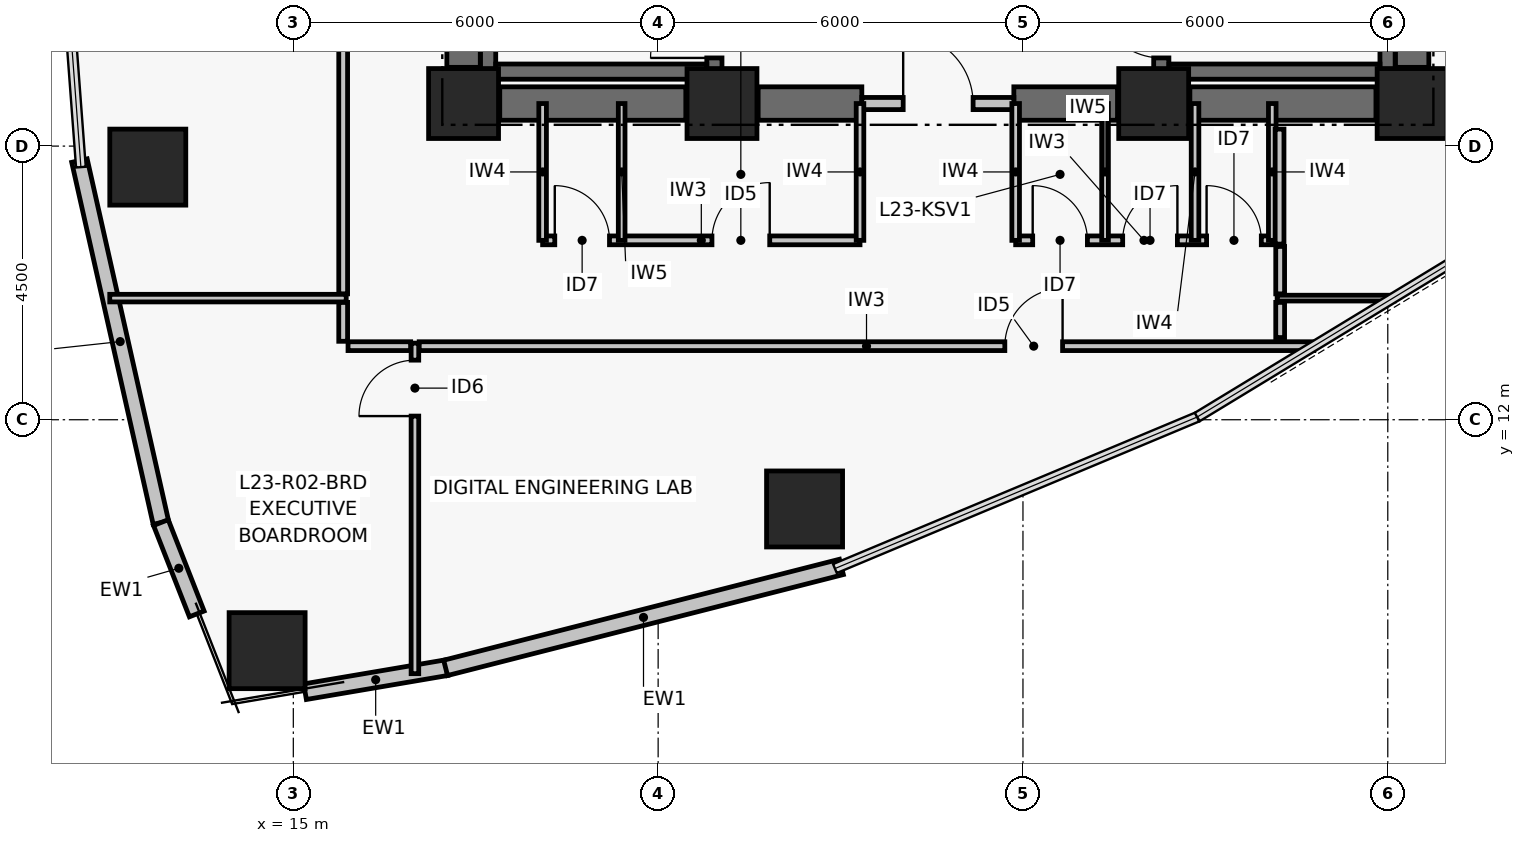
"""IFC4 building model, lengths in metres.
Left out: names, types, materials, properties, quantities, classifications, styles, units other than length and angle.
Written with IfcOpenShell. Run it as: python <this file> out.ifc"""

import sys

from ifc_helpers import new_model, si_unit, direction, frame, frame_2d, origin, origin_2d, place, context, subcontext, project, spatial, rectangle, hollow_rectangle, extrude, element, fill, save


model = new_model("IFC4")
c1 = context("Model", 3, precision=1e-05, world=origin(), true_north=direction((0.0, 1.0)))
c2 = subcontext(c1, "Body", "Model", "MODEL_VIEW")
j1 = project(units=[si_unit("LENGTHUNIT", "METRE"), si_unit("PLANEANGLEUNIT", "RADIAN")], contexts=[c1])
p1 = place(None, origin())
s1 = spatial("IfcSite", under=j1, at=p1, CompositionType="ELEMENT")
p2 = place(p1, origin())
s2 = spatial("IfcBuilding", under=s1, at=p2, CompositionType="ELEMENT")
p3 = place(p2, frame((0.0, 0.0, 96.54)))
s3 = spatial("IfcBuildingStorey", under=s2, at=p3, CompositionType="ELEMENT", Elevation=96.54)
for number, where, z_axis, x_axis in (
    (1, (17.8, 17.2, 0.0), (0.0, 0.0, 1.0), (1.0, 0.0, 0.0)),
    (2, (22.05, 17.2, 0.0), (0.0, 0.0, 1.0), (1.0, 0.0, 0.0)),
    (3, (29.15, 17.2, 0.0), (0.0, 0.0, 1.0), (1.0, 0.0, 0.0)),
    (4, (33.4, 17.2, 0.0), (0.0, 0.0, 1.0), (1.0, 0.0, 0.0)),
):
    element("IfcColumn", number, at=place(p3, frame(where, z_axis=z_axis, x_axis=x_axis)), inside=s3, PredefinedType="COLUMN", context=c2, shape_type="SweptSolid", body=[
        extrude(rectangle(XDim=1.15, YDim=1.15, at=origin_2d()), origin(), (0.0, 0.0, 1.0), 3.72),
    ])
p4 = place(p3, frame((18.395, 17.2, 0.0), z_axis=(0.0, 0.0, 1.0), x_axis=(1.0, 0.0, 0.0)))
e5 = element("IfcWall", 5, at=p4, inside=s3, PredefinedType="SHEAR", context=c2, shape_type="SweptSolid", body=[
    extrude(rectangle(XDim=3.06, YDim=0.55, at=frame_2d((1.53, 0.0))), origin(), (0.0, 0.0, 1.0), 3.47),
])
p5 = place(p3, frame((22.645, 17.2, 0.0), z_axis=(0.0, 0.0, 1.0), x_axis=(1.0, 0.0, 0.0)))
e6 = element("IfcWall", 6, at=p5, inside=s3, PredefinedType="SHEAR", context=c2, shape_type="SweptSolid", body=[
    extrude(rectangle(XDim=1.705, YDim=0.55, at=frame_2d((0.853, 0.0))), origin(), (0.0, 0.0, 1.0), 3.47),
])
p6 = place(p3, frame((26.85, 17.2, 0.0), z_axis=(0.0, 0.0, 1.0), x_axis=(1.0, 0.0, 0.0)))
e7 = element("IfcWall", 7, at=p6, inside=s3, PredefinedType="SHEAR", context=c2, shape_type="SweptSolid", body=[
    extrude(rectangle(XDim=1.705, YDim=0.55, at=frame_2d((0.853, 0.0))), origin(), (0.0, 0.0, 1.0), 3.47),
])
p7 = place(p3, frame((29.745, 17.2, 0.0), z_axis=(0.0, 0.0, 1.0), x_axis=(1.0, 0.0, 0.0)))
e8 = element("IfcWall", 8, at=p7, inside=s3, PredefinedType="SHEAR", context=c2, shape_type="SweptSolid", body=[
    extrude(rectangle(XDim=3.06, YDim=0.55, at=frame_2d((1.53, 0.0))), origin(), (0.0, 0.0, 1.0), 3.47),
])
for number, where, z_axis, x_axis in (
    (9, (17.8, 17.795, 0.0), (0.0, 0.0, 1.0), (0.0, 1.0, 0.0)),
    (10, (33.4, 17.795, 0.0), (0.0, 0.0, 1.0), (0.0, 1.0, 0.0)),
):
    element("IfcWall", number, at=place(p3, frame(where, z_axis=z_axis, x_axis=x_axis)), inside=s3, PredefinedType="SHEAR", context=c2, shape_type="SweptSolid", body=[
        extrude(rectangle(XDim=8.41, YDim=0.55, at=frame_2d((4.205, 0.0))), origin(), (0.0, 0.0, 1.0), 3.47),
    ])
p8 = place(p3, frame((18.204, 17.6, 0.0), z_axis=(0.0, 0.0, 1.0), x_axis=(0.0, 1.0, 0.0)))
e11 = element("IfcWall", 11, at=p8, inside=s3, PredefinedType="SHEAR", context=c2, shape_type="SweptSolid", body=[
    extrude(rectangle(XDim=8.8, YDim=0.25, at=frame_2d((4.4, 0.0))), origin(), (0.0, 0.0, 1.0), 3.47),
])
p9 = place(p3, frame((21.925, 17.6, 0.0), z_axis=(0.0, 0.0, 1.0), x_axis=(0.0, 1.0, 0.0)))
e12 = element("IfcWall", 12, at=p9, inside=s3, PredefinedType="SHEAR", context=c2, shape_type="SweptSolid", body=[
    extrude(rectangle(XDim=8.8, YDim=0.25, at=frame_2d((4.4, 0.0))), origin(), (0.0, 0.0, 1.0), 3.47),
])
p10 = place(p9, frame((0.35, 0.0, 0.0)))
e13 = element("IfcOpeningElement", 13, at=p10, cuts=e12, PredefinedType="OPENING", context=c2, shape_type="SweptSolid", body=[
    extrude(rectangle(XDim=1.05, YDim=2.08, at=frame_2d((0.525, 1.04))), frame((0.0, 0.135, 0.0), z_axis=(0.0, -1.0, 0.0), x_axis=(1.0, 0.0, 0.0)), (0.0, 0.0, 1.0), 0.27),
])
p11 = place(p3, frame((18.329, 17.725, 0.0), z_axis=(0.0, 0.0, 1.0), x_axis=(1.0, 0.0, 0.0)))
e14 = element("IfcWall", 14, at=p11, inside=s3, PredefinedType="SHEAR", context=c2, shape_type="SweptSolid", body=[
    extrude(rectangle(XDim=3.471, YDim=0.25, at=frame_2d((1.735, 0.0))), origin(), (0.0, 0.0, 1.0), 3.47),
])
p12 = place(p3, frame((29.275, 17.6, 0.0), z_axis=(0.0, 0.0, 1.0), x_axis=(0.0, 1.0, 0.0)))
e15 = element("IfcWall", 15, at=p12, inside=s3, PredefinedType="SHEAR", context=c2, shape_type="SweptSolid", body=[
    extrude(rectangle(XDim=8.8, YDim=0.25, at=frame_2d((4.4, 0.0))), origin(), (0.0, 0.0, 1.0), 3.47),
])
p13 = place(p12, frame((0.35, 0.0, 0.0)))
e16 = element("IfcOpeningElement", 16, at=p13, cuts=e15, PredefinedType="OPENING", context=c2, shape_type="SweptSolid", body=[
    extrude(rectangle(XDim=1.05, YDim=2.08, at=frame_2d((0.525, 1.04))), frame((0.0, 0.135, 0.0), z_axis=(0.0, -1.0, 0.0), x_axis=(1.0, 0.0, 0.0)), (0.0, 0.0, 1.0), 0.27),
])
p14 = place(p3, frame((32.996, 17.6, 0.0), z_axis=(0.0, 0.0, 1.0), x_axis=(0.0, 1.0, 0.0)))
e17 = element("IfcWall", 17, at=p14, inside=s3, PredefinedType="SHEAR", context=c2, shape_type="SweptSolid", body=[
    extrude(rectangle(XDim=8.8, YDim=0.25, at=frame_2d((4.4, 0.0))), origin(), (0.0, 0.0, 1.0), 3.47),
])
p15 = place(p3, frame((29.4, 17.725, 0.0), z_axis=(0.0, 0.0, 1.0), x_axis=(1.0, 0.0, 0.0)))
e18 = element("IfcWall", 18, at=p15, inside=s3, PredefinedType="SHEAR", context=c2, shape_type="SweptSolid", body=[
    extrude(rectangle(XDim=3.471, YDim=0.25, at=frame_2d((1.736, 0.0))), origin(), (0.0, 0.0, 1.0), 3.47),
])
for number, where, z_axis, x_axis in (
    (19, (12.607, 16.154, 0.0), (0.0, 0.0, 1.0), (1.0, 0.0, 0.0)),
    (20, (14.569, 8.203, 0.0), (0.0, 0.0, 1.0), (1.0, 0.0, 0.0)),
    (21, (23.408, 10.533, 0.0), (0.0, 0.0, 1.0), (1.0, 0.0, 0.0)),
):
    element("IfcColumn", number, at=place(p3, frame(where, z_axis=z_axis, x_axis=x_axis)), inside=s3, PredefinedType="COLUMN", context=c2, shape_type="SweptSolid", body=[
        extrude(hollow_rectangle(XDim=1.25, YDim=1.25, WallThickness=0.05, at=origin_2d()), origin(), (0.0, 0.0, 1.0), 3.72),
    ])
p16 = place(p3, frame((12.822, 10.309, 0.0), z_axis=(0.0, 0.0, 1.0), x_axis=(-0.219535044336, 0.975604614743, 0.0)))
e22 = element("IfcWall", 22, at=p16, inside=s3, PredefinedType="PARTITIONING", context=c2, shape_type="SweptSolid", body=[
    extrude(rectangle(XDim=6.102, YDim=0.26, at=frame_2d((3.051, 0.0))), origin(), (0.0, 0.0, 1.0), 3.47),
])
p17 = place(p3, frame((13.412, 8.806, 0.0), z_axis=(0.0, 0.0, 1.0), x_axis=(-0.365488551504, 0.930815835018, 0.0)))
e23 = element("IfcWall", 23, at=p17, inside=s3, PredefinedType="PARTITIONING", context=c2, shape_type="SweptSolid", body=[
    extrude(rectangle(XDim=1.614, YDim=0.26, at=frame_2d((0.807, 0.0))), origin(), (0.0, 0.0, 1.0), 3.47),
])
p18 = place(p3, frame((17.516, 7.922, 0.0), z_axis=(0.0, 0.0, 1.0), x_axis=(-0.985905269947, -0.167304508875, 0.0)))
e24 = element("IfcWall", 24, at=p18, inside=s3, PredefinedType="PARTITIONING", context=c2, shape_type="SweptSolid", body=[
    extrude(rectangle(XDim=2.357, YDim=0.26, at=frame_2d((1.178, 0.0))), origin(), (0.0, 0.0, 1.0), 3.47),
])
p19 = place(p3, frame((24.014, 9.58, 0.0), z_axis=(0.0, 0.0, 1.0), x_axis=(-0.968981437296, -0.247133514876, 0.0)))
e25 = element("IfcWall", 25, at=p19, inside=s3, PredefinedType="PARTITIONING", context=c2, shape_type="SweptSolid", body=[
    extrude(rectangle(XDim=6.718, YDim=0.26, at=frame_2d((3.359, 0.0))), origin(), (0.0, 0.0, 1.0), 3.47),
])
p20 = place(p3, frame((24.35, 17.2, 0.0), z_axis=(0.0, 0.0, 1.0), x_axis=(1.0, 0.0, 0.0)))
e26 = element("IfcWall", 26, at=p20, inside=s3, PredefinedType="PARTITIONING", context=c2, shape_type="SweptSolid", body=[
    extrude(rectangle(XDim=2.5, YDim=0.2, at=frame_2d((1.25, 0.0))), origin(), (0.0, 0.0, 1.0), 2.6),
])
p21 = place(p20, frame((0.68, 0.0, 0.0)))
e27 = element("IfcOpeningElement", 27, at=p21, cuts=e26, PredefinedType="OPENING", context=c2, shape_type="SweptSolid", body=[
    extrude(rectangle(XDim=1.15, YDim=2.08, at=frame_2d((0.575, 1.04))), frame((0.0, 0.11, 0.0), z_axis=(0.0, -1.0, 0.0), x_axis=(1.0, 0.0, 0.0)), (0.0, 0.0, 1.0), 0.22),
])
p22 = place(p3, frame((19.1, 14.95, 0.0), z_axis=(0.0, 0.0, 1.0), x_axis=(1.0, 0.0, 0.0)))
e28 = element("IfcWall", 28, at=p22, inside=s3, PredefinedType="PARTITIONING", context=c2, shape_type="SweptSolid", body=[
    extrude(rectangle(XDim=5.22, YDim=0.145, at=frame_2d((2.61, 0.0))), origin(), (0.0, 0.0, 1.0), 2.65),
])
p23 = place(p22, frame((0.2, 0.0, 0.0)))
e29 = element("IfcOpeningElement", 29, at=p23, cuts=e28, PredefinedType="OPENING", context=c2, shape_type="SweptSolid", body=[
    extrude(rectangle(XDim=0.9, YDim=2.02, at=frame_2d((0.45, 1.01))), frame((0.0, 0.083, 0.0), z_axis=(0.0, -1.0, 0.0), x_axis=(1.0, 0.0, 0.0)), (0.0, 0.0, 1.0), 0.165),
])
p24 = place(p22, frame((2.785, 0.0, 0.0)))
e30 = element("IfcOpeningElement", 30, at=p24, cuts=e28, PredefinedType="OPENING", context=c2, shape_type="SweptSolid", body=[
    extrude(rectangle(XDim=0.95, YDim=2.06, at=frame_2d((0.475, 1.03))), frame((0.0, 0.083, 0.0), z_axis=(0.0, -1.0, 0.0), x_axis=(1.0, 0.0, 0.0)), (0.0, 0.0, 1.0), 0.165),
])
p25 = place(p3, frame((26.88, 14.95, 0.0), z_axis=(0.0, 0.0, 1.0), x_axis=(1.0, 0.0, 0.0)))
e31 = element("IfcWall", 31, at=p25, inside=s3, PredefinedType="PARTITIONING", context=c2, shape_type="SweptSolid", body=[
    extrude(rectangle(XDim=4.22, YDim=0.145, at=frame_2d((2.11, 0.0))), origin(), (0.0, 0.0, 1.0), 3.05),
])
p26 = place(p25, frame((0.28, 0.0, 0.0)))
e32 = element("IfcOpeningElement", 32, at=p26, cuts=e31, PredefinedType="OPENING", context=c2, shape_type="SweptSolid", body=[
    extrude(rectangle(XDim=0.9, YDim=2.02, at=frame_2d((0.45, 1.01))), frame((0.0, 0.083, 0.0), z_axis=(0.0, -1.0, 0.0), x_axis=(1.0, 0.0, 0.0)), (0.0, 0.0, 1.0), 0.165),
])
p27 = place(p25, frame((1.76, 0.0, 0.0)))
e33 = element("IfcOpeningElement", 33, at=p27, cuts=e31, PredefinedType="OPENING", context=c2, shape_type="SweptSolid", body=[
    extrude(rectangle(XDim=0.9, YDim=2.02, at=frame_2d((0.45, 1.01))), frame((0.0, 0.083, 0.0), z_axis=(0.0, -1.0, 0.0), x_axis=(1.0, 0.0, 0.0)), (0.0, 0.0, 1.0), 0.165),
])
p28 = place(p25, frame((3.14, 0.0, 0.0)))
e34 = element("IfcOpeningElement", 34, at=p28, cuts=e31, PredefinedType="OPENING", context=c2, shape_type="SweptSolid", body=[
    extrude(rectangle(XDim=0.9, YDim=2.02, at=frame_2d((0.45, 1.01))), frame((0.0, 0.083, 0.0), z_axis=(0.0, -1.0, 0.0), x_axis=(1.0, 0.0, 0.0)), (0.0, 0.0, 1.0), 0.165),
])
p29 = place(p3, frame((19.1, 14.95, 0.0), z_axis=(0.0, 0.0, 1.0), x_axis=(0.0, 1.0, 0.0)))
e35 = element("IfcWall", 35, at=p29, inside=s3, PredefinedType="PARTITIONING", context=c2, shape_type="SweptSolid", body=[
    extrude(rectangle(XDim=2.25, YDim=0.125, at=frame_2d((1.125, 0.0))), origin(), (0.0, 0.0, 1.0), 2.6),
])
p30 = place(p3, frame((20.4, 14.95, 0.0), z_axis=(0.0, 0.0, 1.0), x_axis=(0.0, 1.0, 0.0)))
e36 = element("IfcWall", 36, at=p30, inside=s3, PredefinedType="PARTITIONING", context=c2, shape_type="SweptSolid", body=[
    extrude(rectangle(XDim=2.25, YDim=0.11, at=frame_2d((1.125, 0.0))), origin(), (0.0, 0.0, 1.0), 2.6),
])
for number, where, z_axis, x_axis in (
    (37, (24.32, 14.95, 0.0), (0.0, 0.0, 1.0), (0.0, 1.0, 0.0)),
    (38, (26.88, 14.95, 0.0), (0.0, 0.0, 1.0), (0.0, 1.0, 0.0)),
):
    element("IfcWall", number, at=place(p3, frame(where, z_axis=z_axis, x_axis=x_axis)), inside=s3, PredefinedType="PARTITIONING", context=c2, shape_type="SweptSolid", body=[
        extrude(rectangle(XDim=2.25, YDim=0.125, at=frame_2d((1.125, 0.0))), origin(), (0.0, 0.0, 1.0), 2.6),
    ])
p31 = place(p3, frame((28.35, 14.95, 0.0), z_axis=(0.0, 0.0, 1.0), x_axis=(0.0, 1.0, 0.0)))
e39 = element("IfcWall", 39, at=p31, inside=s3, PredefinedType="PARTITIONING", context=c2, shape_type="SweptSolid", body=[
    extrude(rectangle(XDim=2.25, YDim=0.11, at=frame_2d((1.125, 0.0))), origin(), (0.0, 0.0, 1.0), 2.6),
])
for number, where, z_axis, x_axis in (
    (40, (29.83, 14.95, 0.0), (0.0, 0.0, 1.0), (0.0, 1.0, 0.0)),
    (41, (31.1, 14.95, 0.0), (0.0, 0.0, 1.0), (0.0, 1.0, 0.0)),
):
    element("IfcWall", number, at=place(p3, frame(where, z_axis=z_axis, x_axis=x_axis)), inside=s3, PredefinedType="PARTITIONING", context=c2, shape_type="SweptSolid", body=[
        extrude(rectangle(XDim=2.25, YDim=0.125, at=frame_2d((1.125, 0.0))), origin(), (0.0, 0.0, 1.0), 2.6),
    ])
p32 = place(p3, frame((15.82, 13.93, 0.0), z_axis=(0.0, 0.0, 1.0), x_axis=(0.0, -1.0, 0.0)))
e42 = element("IfcWall", 42, at=p32, inside=s3, PredefinedType="PARTITIONING", context=c2, shape_type="SweptSolid", body=[
    extrude(rectangle(XDim=0.64, YDim=0.145, at=frame_2d((0.32, 0.0))), origin(), (0.0, 0.0, 1.0), 3.05),
])
p33 = place(p3, frame((15.9, 13.21, 0.0), z_axis=(0.0, 0.0, 1.0), x_axis=(1.0, 0.0, 0.0)))
e43 = element("IfcWall", 43, at=p33, inside=s3, PredefinedType="PARTITIONING", context=c2, shape_type="SweptSolid", body=[
    extrude(rectangle(XDim=1.03, YDim=0.145, at=frame_2d((0.515, 0.0))), origin(), (0.0, 0.0, 1.0), 2.65),
])
p34 = place(p3, frame((17.07, 13.21, 0.0), z_axis=(0.0, 0.0, 1.0), x_axis=(1.0, 0.0, 0.0)))
e44 = element("IfcWall", 44, at=p34, inside=s3, PredefinedType="PARTITIONING", context=c2, shape_type="SweptSolid", body=[
    extrude(rectangle(XDim=14.714, YDim=0.145, at=frame_2d((7.357, 0.0))), origin(), (0.0, 0.0, 1.0), 2.65),
])
p35 = place(p34, frame((9.632, 0.0, 0.0)))
e45 = element("IfcOpeningElement", 45, at=p35, cuts=e44, PredefinedType="OPENING", context=c2, shape_type="SweptSolid", body=[
    extrude(rectangle(XDim=0.95, YDim=2.06, at=frame_2d((0.475, 1.03))), frame((0.0, 0.083, 0.0), z_axis=(0.0, -1.0, 0.0), x_axis=(1.0, 0.0, 0.0)), (0.0, 0.0, 1.0), 0.165),
])
p36 = place(p3, frame((31.23, 13.351, 0.0), z_axis=(0.0, 0.0, 1.0), x_axis=(0.0, 1.0, 0.0)))
e46 = element("IfcWall", 46, at=p36, inside=s3, PredefinedType="PARTITIONING", context=c2, shape_type="SweptSolid", body=[
    extrude(rectangle(XDim=0.579, YDim=0.145, at=frame_2d((0.289, 0.0))), origin(), (0.0, 0.0, 1.0), 3.47),
])
p37 = place(p3, frame((31.23, 14.07, 0.0), z_axis=(0.0, 0.0, 1.0), x_axis=(0.0, 1.0, 0.0)))
e47 = element("IfcWall", 47, at=p37, inside=s3, PredefinedType="PARTITIONING", context=c2, shape_type="SweptSolid", body=[
    extrude(rectangle(XDim=0.78, YDim=0.145, at=frame_2d((0.39, 0.0))), origin(), (0.0, 0.0, 1.0), 2.85),
])
p38 = place(p3, frame((31.22, 14.889, 0.0), z_axis=(0.0, 0.0, 1.0), x_axis=(0.0, 1.0, 0.0)))
e48 = element("IfcWall", 48, at=p38, inside=s3, PredefinedType="PARTITIONING", context=c2, shape_type="SweptSolid", body=[
    extrude(rectangle(XDim=1.891, YDim=0.145, at=frame_2d((0.946, 0.0))), origin(), (0.0, 0.0, 1.0), 2.6),
])
p39 = place(p3, frame((15.82, 28.7, 0.0), z_axis=(0.0, 0.0, 1.0), x_axis=(0.0, -1.0, 0.0)))
e49 = element("IfcWall", 49, at=p39, inside=s3, PredefinedType="PARTITIONING", context=c2, shape_type="SweptSolid", body=[
    extrude(rectangle(XDim=14.63, YDim=0.145, at=frame_2d((7.315, 0.0))), origin(), (0.0, 0.0, 1.0), 2.65),
])
p40 = place(p39, frame((6.84, 0.0, 0.0)))
e50 = element("IfcOpeningElement", 50, at=p40, cuts=e49, PredefinedType="OPENING", context=c2, shape_type="SweptSolid", body=[
    extrude(rectangle(XDim=0.95, YDim=2.06, at=frame_2d((0.475, 1.03))), frame((0.0, 0.083, 0.0), z_axis=(0.0, -1.0, 0.0), x_axis=(1.0, 0.0, 0.0)), (0.0, 0.0, 1.0), 0.165),
])
p41 = place(p3, frame((17.0, 7.824, 0.0), z_axis=(0.0, 0.0, 1.0), x_axis=(0.0, 1.0, 0.0)))
e51 = element("IfcWall", 51, at=p41, inside=s3, PredefinedType="PARTITIONING", context=c2, shape_type="SweptSolid", body=[
    extrude(rectangle(XDim=5.436, YDim=0.125, at=frame_2d((2.718, 0.0))), origin(), (0.0, 0.0, 1.0), 2.85),
])
p42 = place(p41, frame((4.236, 0.0, 0.0)))
e52 = element("IfcOpeningElement", 52, at=p42, cuts=e51, PredefinedType="OPENING", context=c2, shape_type="SweptSolid", body=[
    extrude(rectangle(XDim=0.92, YDim=2.05, at=frame_2d((0.46, 1.025))), frame((0.0, 0.073, 0.0), z_axis=(0.0, -1.0, 0.0), x_axis=(1.0, 0.0, 0.0)), (0.0, 0.0, 1.0), 0.145),
])
p43 = place(p3, frame((11.981, 14.0, 0.0), z_axis=(0.0, 0.0, 1.0), x_axis=(1.0, 0.0, 0.0)))
e53 = element("IfcWall", 53, at=p43, inside=s3, PredefinedType="PARTITIONING", context=c2, shape_type="SweptSolid", body=[
    extrude(rectangle(XDim=3.889, YDim=0.125, at=frame_2d((1.944, 0.0))), origin(), (0.0, 0.0, 1.0), 2.85),
])
p44 = place(p3, frame((31.18, 14.0, 0.0), z_axis=(0.0, 0.0, 1.0), x_axis=(1.0, 0.0, 0.0)))
e54 = element("IfcWall", 54, at=p44, inside=s3, PredefinedType="PARTITIONING", context=c2, shape_type="SweptSolid", body=[
    extrude(rectangle(XDim=1.924, YDim=0.095, at=frame_2d((0.962, 0.0))), origin(), (0.0, 0.0, 1.0), 3.47),
])
p45 = place(p10, origin())
e55 = element("IfcDoor", 55, at=p45, inside=s3, OperationType="SINGLE_SWING_LEFT", PredefinedType="DOOR", context=c2, shape_type="SweptSolid", body=[
    extrude(rectangle(XDim=1.05, YDim=2.08, at=frame_2d((0.525, 1.04))), frame((0.0, 0.025, 0.0), z_axis=(0.0, -1.0, 0.0), x_axis=(1.0, 0.0, 0.0)), (0.0, 0.0, 1.0), 0.05),
])
fill(e13, e55)
p46 = place(p13, origin())
e56 = element("IfcDoor", 56, at=p46, inside=s3, OperationType="SINGLE_SWING_RIGHT", PredefinedType="DOOR", context=c2, shape_type="SweptSolid", body=[
    extrude(rectangle(XDim=1.05, YDim=2.08, at=frame_2d((0.525, 1.04))), frame((0.0, 0.025, 0.0), z_axis=(0.0, -1.0, 0.0), x_axis=(1.0, 0.0, 0.0)), (0.0, 0.0, 1.0), 0.05),
])
fill(e16, e56)
p47 = place(p21, origin())
e57 = element("IfcDoor", 57, at=p47, inside=s3, OperationType="SINGLE_SWING_LEFT", PredefinedType="DOOR", context=c2, shape_type="SweptSolid", body=[
    extrude(rectangle(XDim=1.15, YDim=2.08, at=frame_2d((0.575, 1.04))), frame((0.0, 0.025, 0.0), z_axis=(0.0, -1.0, 0.0), x_axis=(1.0, 0.0, 0.0)), (0.0, 0.0, 1.0), 0.05),
])
fill(e27, e57)
p48 = place(p23, origin())
e58 = element("IfcDoor", 58, at=p48, inside=s3, OperationType="SINGLE_SWING_LEFT", PredefinedType="DOOR", context=c2, shape_type="SweptSolid", body=[
    extrude(rectangle(XDim=0.9, YDim=2.02, at=frame_2d((0.45, 1.01))), frame((0.0, 0.025, 0.0), z_axis=(0.0, -1.0, 0.0), x_axis=(1.0, 0.0, 0.0)), (0.0, 0.0, 1.0), 0.05),
])
fill(e29, e58)
p49 = place(p24, origin())
e59 = element("IfcDoor", 59, at=p49, inside=s3, OperationType="SINGLE_SWING_RIGHT", PredefinedType="DOOR", context=c2, shape_type="SweptSolid", body=[
    extrude(rectangle(XDim=0.95, YDim=2.06, at=frame_2d((0.475, 1.03))), frame((0.0, 0.025, 0.0), z_axis=(0.0, -1.0, 0.0), x_axis=(1.0, 0.0, 0.0)), (0.0, 0.0, 1.0), 0.05),
])
fill(e30, e59)
p50 = place(p26, origin())
e60 = element("IfcDoor", 60, at=p50, inside=s3, OperationType="SINGLE_SWING_LEFT", PredefinedType="DOOR", context=c2, shape_type="SweptSolid", body=[
    extrude(rectangle(XDim=0.9, YDim=2.02, at=frame_2d((0.45, 1.01))), frame((0.0, 0.025, 0.0), z_axis=(0.0, -1.0, 0.0), x_axis=(1.0, 0.0, 0.0)), (0.0, 0.0, 1.0), 0.05),
])
fill(e32, e60)
p51 = place(p27, origin())
e61 = element("IfcDoor", 61, at=p51, inside=s3, OperationType="SINGLE_SWING_RIGHT", PredefinedType="DOOR", context=c2, shape_type="SweptSolid", body=[
    extrude(rectangle(XDim=0.9, YDim=2.02, at=frame_2d((0.45, 1.01))), frame((0.0, 0.025, 0.0), z_axis=(0.0, -1.0, 0.0), x_axis=(1.0, 0.0, 0.0)), (0.0, 0.0, 1.0), 0.05),
])
fill(e33, e61)
p52 = place(p28, origin())
e62 = element("IfcDoor", 62, at=p52, inside=s3, OperationType="SINGLE_SWING_LEFT", PredefinedType="DOOR", context=c2, shape_type="SweptSolid", body=[
    extrude(rectangle(XDim=0.9, YDim=2.02, at=frame_2d((0.45, 1.01))), frame((0.0, 0.025, 0.0), z_axis=(0.0, -1.0, 0.0), x_axis=(1.0, 0.0, 0.0)), (0.0, 0.0, 1.0), 0.05),
])
fill(e34, e62)
p53 = place(p35, origin())
e63 = element("IfcDoor", 63, at=p53, inside=s3, OperationType="SINGLE_SWING_RIGHT", PredefinedType="DOOR", context=c2, shape_type="SweptSolid", body=[
    extrude(rectangle(XDim=0.95, YDim=2.06, at=frame_2d((0.475, 1.03))), frame((0.0, 0.025, 0.0), z_axis=(0.0, -1.0, 0.0), x_axis=(1.0, 0.0, 0.0)), (0.0, 0.0, 1.0), 0.05),
])
fill(e45, e63)
p54 = place(p42, origin())
e64 = element("IfcDoor", 64, at=p54, inside=s3, OperationType="SINGLE_SWING_LEFT", PredefinedType="DOOR", context=c2, shape_type="SweptSolid", body=[
    extrude(rectangle(XDim=0.92, YDim=2.05, at=frame_2d((0.46, 1.025))), frame((0.0, 0.025, 0.0), z_axis=(0.0, -1.0, 0.0), x_axis=(1.0, 0.0, 0.0)), (0.0, 0.0, 1.0), 0.05),
])
fill(e52, e64)
save(model, sys.argv[1])
